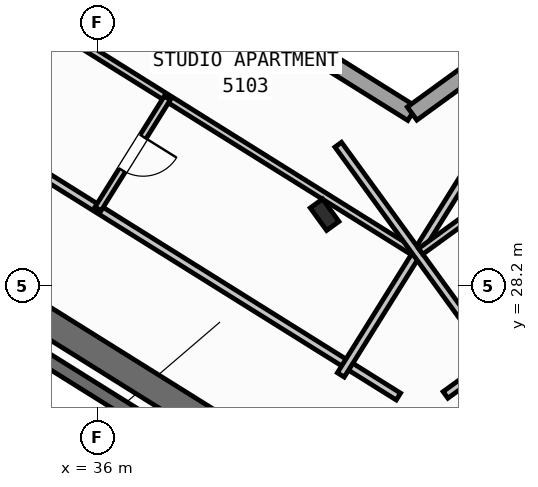
"""IFC4 building model, lengths in metres.
Left out: names, types, materials, properties, quantities, classifications, styles, units other than length and angle.
Written with IfcOpenShell. Run it as: python <this file> out.ifc"""

import sys

from ifc_helpers import new_model, si_unit, direction, frame, frame_2d, origin, origin_2d, place, context, subcontext, project, spatial, rectangle, i_section, extrude, source, transform, mapped, element, fill, save


model = new_model("IFC4")
c1 = context("Model", 3, precision=1e-05, world=origin(), true_north=direction((0.0, 1.0)))
c2 = subcontext(c1, "Body", "Model", "MODEL_VIEW")
j1 = project(units=[si_unit("LENGTHUNIT", "METRE"), si_unit("PLANEANGLEUNIT", "RADIAN")], contexts=[c1])
p1 = place(None, origin())
s1 = spatial("IfcSite", under=j1, at=p1, CompositionType="ELEMENT")
p2 = place(p1, origin())
s2 = spatial("IfcBuilding", under=s1, at=p2, CompositionType="ELEMENT")
p3 = place(p2, frame((0.0, 0.0, 204.0)))
s3 = spatial("IfcBuildingStorey", under=s2, at=p3, CompositionType="ELEMENT", Elevation=204.0)
p4 = place(p3, frame((40.573, 24.01, 0.0), z_axis=(0.0, 0.0, 1.0), x_axis=(-0.848047359947, 0.529920442413, 0.0)))
e1 = element("IfcWall", 1, at=p4, inside=s3, PredefinedType="SHEAR", context=c2, shape_type="SweptSolid", body=[
    extrude(rectangle(XDim=13.14, YDim=0.55, at=frame_2d((6.57, 0.0))), origin(), (0.0, 0.0, 1.0), 3.35),
])
m1 = source(origin(), c2, "Body", "SweptSolid", [
    extrude(i_section(OverallWidth=0.3, OverallDepth=0.55, WebThickness=0.015, FlangeThickness=0.029, at=origin_2d()), origin(), (0.0, 0.0, 1.0), 3.6),
])
p5 = place(p3, frame((40.479, 29.601, 0.0), z_axis=(0.0, 0.0, 1.0), x_axis=(0.809016994375, 0.587785252292, 0.0)))
e2 = element("IfcColumn", 2, at=p5, inside=s3, PredefinedType="COLUMN", context=c2, shape_type="MappedRepresentation", body=[
    mapped(m1, transform((0.0, 0.0, 0.0), scale=1.0)),
])
p6 = place(p3, frame((17.424, 47.083, 0.0), z_axis=(0.0, 0.0, 1.0), x_axis=(0.848049927979, -0.529916332693, 0.0)))
e3 = element("IfcWall", 3, at=p6, inside=s3, PredefinedType="STANDARD", context=c2, shape_type="SweptSolid", body=[
    extrude(rectangle(XDim=29.223, YDim=0.32, at=frame_2d((14.612, 0.0))), origin(), (0.0, 0.0, 1.0), 3.35),
])
p7 = place(p6, frame((8.799, 0.0, 0.0)))
e4 = element("IfcOpeningElement", 4, at=p7, cuts=e3, PredefinedType="OPENING", context=c2, shape_type="SweptSolid", body=[
    extrude(rectangle(XDim=1.05, YDim=2.15, at=frame_2d((0.525, 1.075))), frame((0.0, 0.17, 0.0), z_axis=(0.0, -1.0, 0.0), x_axis=(1.0, 0.0, 0.0)), (0.0, 0.0, 1.0), 0.34),
])
p8 = place(p6, frame((0.794, 0.0, 0.9)))
e5 = element("IfcOpeningElement", 5, at=p8, cuts=e3, PredefinedType="OPENING", context=c2, shape_type="SweptSolid", body=[
    extrude(rectangle(XDim=1.65, YDim=1.45, at=frame_2d((0.825, 0.725))), frame((0.0, 0.17, 0.0), z_axis=(0.0, -1.0, 0.0), x_axis=(1.0, 0.0, 0.0)), (0.0, 0.0, 1.0), 0.34),
])
p9 = place(p6, frame((4.056, 0.0, 0.9)))
e6 = element("IfcOpeningElement", 6, at=p9, cuts=e3, PredefinedType="OPENING", context=c2, shape_type="SweptSolid", body=[
    extrude(rectangle(XDim=1.35, YDim=1.45, at=frame_2d((0.675, 0.725))), frame((0.0, 0.17, 0.0), z_axis=(0.0, -1.0, 0.0), x_axis=(1.0, 0.0, 0.0)), (0.0, 0.0, 1.0), 0.34),
])
p10 = place(p6, frame((7.151, 0.0, 1.0)))
e7 = element("IfcOpeningElement", 7, at=p10, cuts=e3, PredefinedType="OPENING", context=c2, shape_type="SweptSolid", body=[
    extrude(rectangle(XDim=0.9, YDim=1.25, at=frame_2d((0.45, 0.625))), frame((0.0, 0.17, 0.0), z_axis=(0.0, -1.0, 0.0), x_axis=(1.0, 0.0, 0.0)), (0.0, 0.0, 1.0), 0.34),
])
p11 = place(p6, frame((14.612, 0.0, 1.0)))
e8 = element("IfcOpeningElement", 8, at=p11, cuts=e3, PredefinedType="OPENING", context=c2, shape_type="SweptSolid", body=[
    extrude(rectangle(XDim=0.9, YDim=1.25, at=frame_2d((0.45, 0.625))), frame((0.0, 0.17, 0.0), z_axis=(0.0, -1.0, 0.0), x_axis=(1.0, 0.0, 0.0)), (0.0, 0.0, 1.0), 0.34),
])
p12 = place(p6, frame((17.254, 0.0, 1.0)))
e9 = element("IfcOpeningElement", 9, at=p12, cuts=e3, PredefinedType="OPENING", context=c2, shape_type="SweptSolid", body=[
    extrude(rectangle(XDim=0.9, YDim=1.25, at=frame_2d((0.45, 0.625))), frame((0.0, 0.17, 0.0), z_axis=(0.0, -1.0, 0.0), x_axis=(1.0, 0.0, 0.0)), (0.0, 0.0, 1.0), 0.34),
])
p13 = place(p6, frame((21.139, 0.0, 0.9)))
e10 = element("IfcOpeningElement", 10, at=p13, cuts=e3, PredefinedType="OPENING", context=c2, shape_type="SweptSolid", body=[
    extrude(rectangle(XDim=1.35, YDim=1.45, at=frame_2d((0.675, 0.725))), frame((0.0, 0.17, 0.0), z_axis=(0.0, -1.0, 0.0), x_axis=(1.0, 0.0, 0.0)), (0.0, 0.0, 1.0), 0.34),
])
p14 = place(p6, frame((25.778, 0.0, 0.9)))
e11 = element("IfcOpeningElement", 11, at=p14, cuts=e3, PredefinedType="OPENING", context=c2, shape_type="SweptSolid", body=[
    extrude(rectangle(XDim=1.35, YDim=1.45, at=frame_2d((0.675, 0.725))), frame((0.0, 0.17, 0.0), z_axis=(0.0, -1.0, 0.0), x_axis=(1.0, 0.0, 0.0)), (0.0, 0.0, 1.0), 0.34),
])
p15 = place(p3, frame((42.207, 31.597, 0.0), z_axis=(0.0, 0.0, 1.0), x_axis=(0.809020333377, 0.587780656523, 0.0)))
e12 = element("IfcWall", 12, at=p15, inside=s3, PredefinedType="STANDARD", context=c2, shape_type="SweptSolid", body=[
    extrude(rectangle(XDim=15.223, YDim=0.32, at=frame_2d((7.611, 0.0))), origin(), (0.0, 0.0, 1.0), 3.35),
])
p16 = place(p15, frame((12.82, 0.0, 0.0)))
e13 = element("IfcOpeningElement", 13, at=p16, cuts=e12, PredefinedType="OPENING", context=c2, shape_type="SweptSolid", body=[
    extrude(rectangle(XDim=1.05, YDim=2.15, at=frame_2d((0.525, 1.075))), frame((0.0, 0.17, 0.0), z_axis=(0.0, -1.0, 0.0), x_axis=(1.0, 0.0, 0.0)), (0.0, 0.0, 1.0), 0.34),
])
p17 = place(p15, frame((1.745, 0.0, 0.9)))
e14 = element("IfcOpeningElement", 14, at=p17, cuts=e12, PredefinedType="OPENING", context=c2, shape_type="SweptSolid", body=[
    extrude(rectangle(XDim=1.65, YDim=1.45, at=frame_2d((0.825, 0.725))), frame((0.0, 0.17, 0.0), z_axis=(0.0, -1.0, 0.0), x_axis=(1.0, 0.0, 0.0)), (0.0, 0.0, 1.0), 0.34),
])
p18 = place(p15, frame((5.985, 0.0, 0.9)))
e15 = element("IfcOpeningElement", 15, at=p18, cuts=e12, PredefinedType="OPENING", context=c2, shape_type="SweptSolid", body=[
    extrude(rectangle(XDim=1.65, YDim=1.45, at=frame_2d((0.825, 0.725))), frame((0.0, 0.17, 0.0), z_axis=(0.0, -1.0, 0.0), x_axis=(1.0, 0.0, 0.0)), (0.0, 0.0, 1.0), 0.34),
])
p19 = place(p15, frame((10.219, 0.0, 1.0)))
e16 = element("IfcOpeningElement", 16, at=p19, cuts=e12, PredefinedType="OPENING", context=c2, shape_type="SweptSolid", body=[
    extrude(rectangle(XDim=0.9, YDim=1.25, at=frame_2d((0.45, 0.625))), frame((0.0, 0.17, 0.0), z_axis=(0.0, -1.0, 0.0), x_axis=(1.0, 0.0, 0.0)), (0.0, 0.0, 1.0), 0.34),
])
p20 = place(p3, frame((39.721, 23.788, 0.0), z_axis=(0.0, 0.0, 1.0), x_axis=(-0.848054434086, 0.529909121291, 0.0)))
e17 = element("IfcWall", 17, at=p20, inside=s3, PredefinedType="SHEAR", context=c2, shape_type="SweptSolid", body=[
    extrude(rectangle(XDim=7.33, YDim=0.26, at=frame_2d((3.665, 0.0))), origin(), (0.0, 0.0, 1.0), 3.35),
])
p21 = place(p3, frame((41.936, 26.012, 0.0), z_axis=(0.0, 0.0, 1.0), x_axis=(-0.848051154596, 0.529914369676, 0.0)))
e18 = element("IfcWall", 18, at=p21, inside=s3, PredefinedType="PARTITIONING", context=c2, shape_type="SweptSolid", body=[
    extrude(rectangle(XDim=15.57, YDim=0.16, at=frame_2d((7.785, 0.0))), origin(), (0.0, 0.0, 1.0), 3.34),
])
p22 = place(p21, frame((10.83, 0.0, 0.0)))
e19 = element("IfcOpeningElement", 19, at=p22, cuts=e18, PredefinedType="OPENING", context=c2, shape_type="SweptSolid", body=[
    extrude(rectangle(XDim=1.0, YDim=2.1, at=frame_2d((0.5, 1.05))), frame((0.0, 0.09, 0.0), z_axis=(0.0, -1.0, 0.0), x_axis=(1.0, 0.0, 0.0)), (0.0, 0.0, 1.0), 0.18),
])
p23 = place(p3, frame((43.704, 31.086, 0.0), z_axis=(0.0, 0.0, 1.0), x_axis=(-0.529906828443, -0.848055866774, 0.0)))
e20 = element("IfcWall", 20, at=p23, inside=s3, PredefinedType="PARTITIONING", context=c2, shape_type="SweptSolid", body=[
    extrude(rectangle(XDim=5.48, YDim=0.16, at=frame_2d((2.74, 0.0))), origin(), (0.0, 0.0, 1.0), 3.34),
])
p24 = place(p3, frame((42.226, 28.873, 0.0), z_axis=(0.0, 0.0, 1.0), x_axis=(-0.848049134363, 0.529917602752, 0.0)))
e21 = element("IfcWall", 21, at=p24, inside=s3, PredefinedType="PLUMBINGWALL", context=c2, shape_type="SweptSolid", body=[
    extrude(rectangle(XDim=14.3, YDim=0.14, at=frame_2d((7.15, 0.0))), origin(), (0.0, 0.0, 1.0), 3.34),
])
p25 = place(p24, frame((9.57, 0.0, 0.0)))
e22 = element("IfcOpeningElement", 22, at=p25, cuts=e21, PredefinedType="OPENING", context=c2, shape_type="SweptSolid", body=[
    extrude(rectangle(XDim=0.92, YDim=2.08, at=frame_2d((0.46, 1.04))), frame((0.0, 0.08, 0.0), z_axis=(0.0, -1.0, 0.0), x_axis=(1.0, 0.0, 0.0)), (0.0, 0.0, 1.0), 0.16),
])
p26 = place(p3, frame((37.375, 31.904, 0.0), z_axis=(0.0, 0.0, 1.0), x_axis=(-0.529913878929, -0.848051461244, 0.0)))
e23 = element("IfcWall", 23, at=p26, inside=s3, PredefinedType="PLUMBINGWALL", context=c2, shape_type="SweptSolid", body=[
    extrude(rectangle(XDim=2.58, YDim=0.14, at=frame_2d((1.29, 0.0))), origin(), (0.0, 0.0, 1.0), 3.34),
])
p27 = place(p26, frame((0.9, 0.0, 0.0)))
e24 = element("IfcOpeningElement", 24, at=p27, cuts=e23, PredefinedType="OPENING", context=c2, shape_type="SweptSolid", body=[
    extrude(rectangle(XDim=0.78, YDim=2.05, at=frame_2d((0.39, 1.025))), frame((0.0, 0.08, 0.0), z_axis=(0.0, -1.0, 0.0), x_axis=(1.0, 0.0, 0.0)), (0.0, 0.0, 1.0), 0.16),
])
p28 = place(p3, frame((42.866, 26.044, 0.0), z_axis=(0.0, 0.0, 1.0), x_axis=(0.809020254154, 0.587780765566, 0.0)))
e25 = element("IfcWall", 25, at=p28, inside=s3, PredefinedType="PARTITIONING", context=c2, shape_type="SweptSolid", body=[
    extrude(rectangle(XDim=14.67, YDim=0.16, at=frame_2d((7.335, 0.0))), origin(), (0.0, 0.0, 1.0), 3.34),
])
p29 = place(p28, frame((10.2, 0.0, 0.0)))
e26 = element("IfcOpeningElement", 26, at=p29, cuts=e25, PredefinedType="OPENING", context=c2, shape_type="SweptSolid", body=[
    extrude(rectangle(XDim=1.0, YDim=2.1, at=frame_2d((0.5, 1.05))), frame((0.0, 0.09, 0.0), z_axis=(0.0, -1.0, 0.0), x_axis=(1.0, 0.0, 0.0)), (0.0, 0.0, 1.0), 0.18),
])
p30 = place(p3, frame((43.969, 26.55, 0.0), z_axis=(0.0, 0.0, 1.0), x_axis=(-0.587776919386, 0.80902304852, 0.0)))
e27 = element("IfcWall", 27, at=p30, inside=s3, PredefinedType="PARTITIONING", context=c2, shape_type="SweptSolid", body=[
    extrude(rectangle(XDim=5.48, YDim=0.16, at=frame_2d((2.74, 0.0))), origin(), (0.0, 0.0, 1.0), 3.34),
])
p31 = place(p3, frame((42.377, 28.878, 0.0), z_axis=(0.0, 0.0, 1.0), x_axis=(0.809020411523, 0.587780548963, 0.0)))
e28 = element("IfcWall", 28, at=p31, inside=s3, PredefinedType="PLUMBINGWALL", context=c2, shape_type="SweptSolid", body=[
    extrude(rectangle(XDim=13.4, YDim=0.14, at=frame_2d((6.7, 0.0))), origin(), (0.0, 0.0, 1.0), 3.34),
])
p32 = place(p31, frame((8.94, 0.0, 0.0)))
e29 = element("IfcOpeningElement", 29, at=p32, cuts=e28, PredefinedType="OPENING", context=c2, shape_type="SweptSolid", body=[
    extrude(rectangle(XDim=0.92, YDim=2.08, at=frame_2d((0.46, 1.04))), frame((0.0, 0.08, 0.0), z_axis=(0.0, -1.0, 0.0), x_axis=(1.0, 0.0, 0.0)), (0.0, 0.0, 1.0), 0.16),
])
m2 = source(origin(), c2, "Body", "SweptSolid", [
    extrude(rectangle(XDim=1.35, YDim=1.45, at=frame_2d((0.675, 0.725))), frame((0.0, 0.03, 0.0), z_axis=(0.0, -1.0, 0.0), x_axis=(1.0, 0.0, 0.0)), (0.0, 0.0, 1.0), 0.06),
])
p33 = place(p14, origin())
e30 = element("IfcWindow", 30, at=p33, inside=s3, PartitioningType="SINGLE_PANEL", PredefinedType="WINDOW", context=c2, shape_type="MappedRepresentation", body=[
    mapped(m2, transform((0.0, 0.0, 0.0), scale=1.0)),
])
fill(e11, e30)
m3 = source(origin(), c2, "Body", "SweptSolid", [
    extrude(rectangle(XDim=0.78, YDim=2.05, at=frame_2d((0.39, 1.025))), frame((0.0, 0.025, 0.0), z_axis=(0.0, -1.0, 0.0), x_axis=(1.0, 0.0, 0.0)), (0.0, 0.0, 1.0), 0.05),
])
p34 = place(p27, origin())
e31 = element("IfcDoor", 31, at=p34, inside=s3, OperationType="SINGLE_SWING_LEFT", PredefinedType="DOOR", context=c2, shape_type="MappedRepresentation", body=[
    mapped(m3, transform((0.0, 0.0, 0.0), scale=1.0)),
])
fill(e24, e31)
save(model, sys.argv[1])
